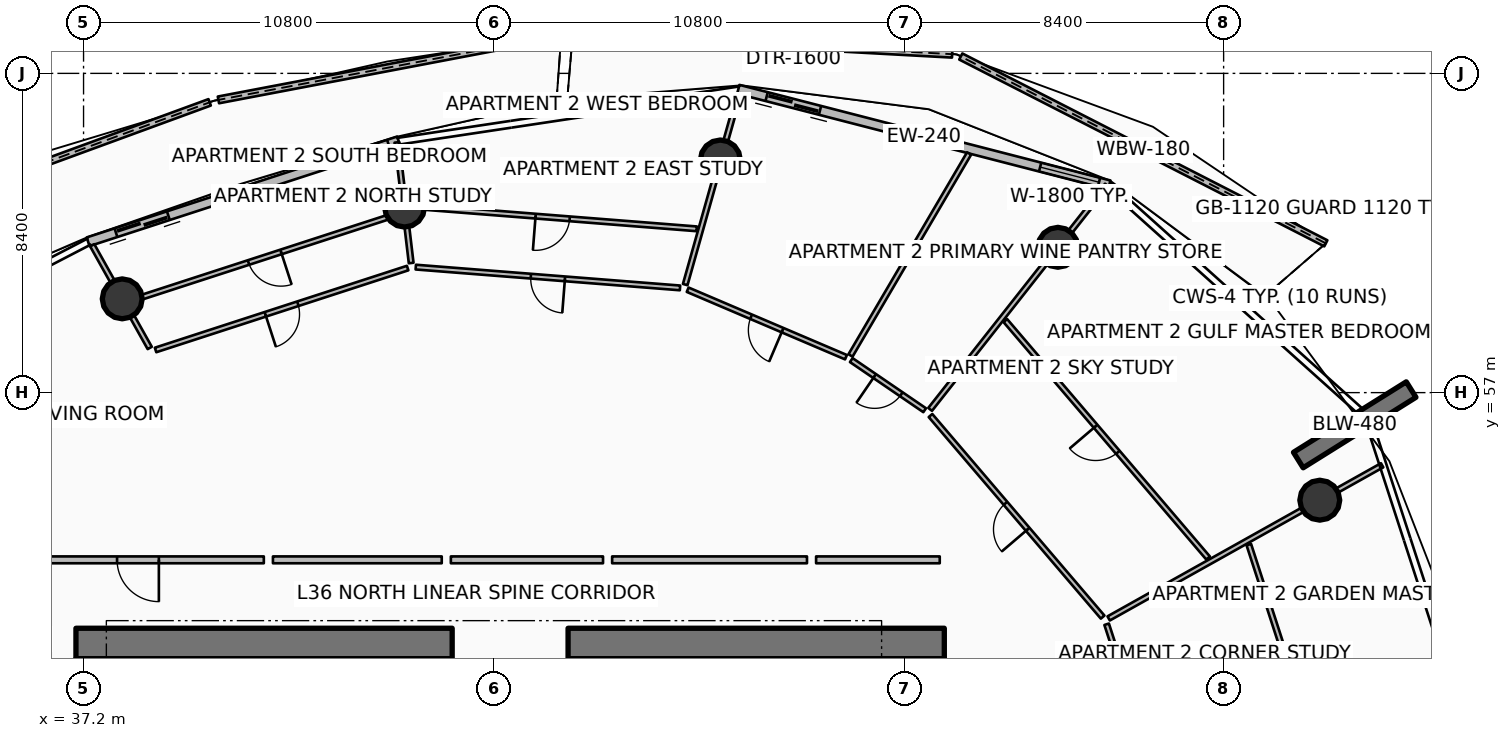
"""IFC4 building model, lengths in metres.
Left out: names, types, materials, properties, quantities, classifications, styles, units other than length and angle.
Written with IfcOpenShell. Run it as: python <this file> out.ifc"""

import sys

from ifc_helpers import new_model, si_unit, direction, frame, frame_2d, origin, origin_2d, place, context, subcontext, project, spatial, polyline, rectangle, circle, outline, extrude, element, fill, save


model = new_model("IFC4")
c1 = context("Model", 3, precision=1e-05, world=origin(), true_north=direction((0.0, 1.0)))
c2 = subcontext(c1, "Body", "Model", "MODEL_VIEW")
j1 = project(units=[si_unit("LENGTHUNIT", "METRE"), si_unit("PLANEANGLEUNIT", "RADIAN")], contexts=[c1])
p1 = place(None, origin())
s1 = spatial("IfcSite", under=j1, at=p1, CompositionType="ELEMENT")
p2 = place(p1, origin())
s2 = spatial("IfcBuilding", under=s1, at=p2, CompositionType="ELEMENT")
p3 = place(p2, frame((0.0, 0.0, 146.55)))
s3 = spatial("IfcBuildingStorey", under=s2, at=p3, CompositionType="ELEMENT", Elevation=146.55)
p4 = place(p3, frame((37.0, 50.4, 0.0), z_axis=(0.0, 0.0, 1.0), x_axis=(1.0, 0.0, 0.0)))
e1 = element("IfcWall", 1, at=p4, inside=s3, PredefinedType="SHEAR", context=c2, shape_type="SweptSolid", body=[
    extrude(rectangle(XDim=9.9, YDim=0.8, at=frame_2d((4.95, 0.0))), origin(), (0.0, 0.0, 1.0), 3.75),
])
p5 = place(p3, frame((49.95, 50.4, 0.0), z_axis=(0.0, 0.0, 1.0), x_axis=(1.0, 0.0, 0.0)))
e2 = element("IfcWall", 2, at=p5, inside=s3, PredefinedType="SHEAR", context=c2, shape_type="SweptSolid", body=[
    extrude(rectangle(XDim=9.9, YDim=0.8, at=frame_2d((4.95, 0.0))), origin(), (0.0, 0.0, 1.0), 3.75),
])
p6 = place(p3, frame((69.165, 55.226, 0.0), z_axis=(0.0, 0.0, 1.0), x_axis=(0.848053161125, 0.529911158502, 0.0)))
e3 = element("IfcWall", 3, at=p6, inside=s3, PredefinedType="SOLIDWALL", context=c2, shape_type="SweptSolid", body=[
    extrude(rectangle(XDim=3.5, YDim=0.48, at=frame_2d((1.75, 0.0))), origin(), (0.0, 0.0, 1.0), 3.75),
])
for number, where, z_axis, x_axis in (
    (4, (69.73, 54.169, 0.0), (0.0, 0.0, 1.0), (1.0, 0.0, 0.0)),
    (5, (62.84, 60.824, 0.0), (0.0, 0.0, 1.0), (1.0, 0.0, 0.0)),
    (6, (53.957, 63.122, 0.0), (0.0, 0.0, 1.0), (1.0, 0.0, 0.0)),
    (7, (45.647, 61.881, 0.0), (0.0, 0.0, 1.0), (1.0, 0.0, 0.0)),
    (8, (38.218, 59.467, 0.0), (0.0, 0.0, 1.0), (1.0, 0.0, 0.0)),
):
    element("IfcColumn", number, at=place(p3, frame(where, z_axis=z_axis, x_axis=x_axis)), inside=s3, PredefinedType="COLUMN", context=c2, shape_type="SweptSolid", body=[
        extrude(circle(Radius=0.525, at=origin_2d()), origin(), (0.0, 0.0, 1.0), 3.5),
    ])
p7 = place(p3, frame((69.89, 60.928, 0.0), z_axis=(0.0, 0.0, 1.0), x_axis=(-0.890197806796, 0.455574214345, 0.0)))
e9 = element("IfcWall", 9, at=p7, inside=s3, PredefinedType="PARAPET", context=c2, shape_type="SweptSolid", body=[
    extrude(outline(polyline([(0.0, 0.0), (10.791, 0.0), (10.791, 1.148), (5.395, 1.284), (0.0, 1.483), (0.0, 0.0)])), frame((0.0, 0.09, 0.0), z_axis=(0.0, -1.0, 0.0), x_axis=(1.0, 0.0, 0.0)), (0.0, 0.0, 1.0), 0.18),
])
p8 = place(p3, frame((60.057, 65.905, 0.0), z_axis=(0.0, 0.0, 1.0), x_axis=(-0.998521425171, 0.05435957574, 0.0)))
e10 = element("IfcWall", 10, at=p8, inside=s3, PredefinedType="PARAPET", context=c2, shape_type="SweptSolid", body=[
    extrude(outline(polyline([(0.0, 0.0), (9.998, 0.0), (9.998, 1.224), (4.999, 1.127), (0.0, 1.148), (0.0, 0.0)])), frame((0.0, 0.09, 0.0), z_axis=(0.0, -1.0, 0.0), x_axis=(1.0, 0.0, 0.0)), (0.0, 0.0, 1.0), 0.18),
])
p9 = place(p3, frame((49.772, 66.417, 0.0), z_axis=(0.0, 0.0, 1.0), x_axis=(-0.982405045707, -0.186762753697, 0.0)))
e11 = element("IfcWall", 11, at=p9, inside=s3, PredefinedType="PARAPET", context=c2, shape_type="SweptSolid", body=[
    extrude(outline(polyline([(0.0, 0.0), (9.185, 0.0), (9.184, 1.632), (4.592, 1.418), (0.0, 1.233), (0.0, 0.0)])), frame((0.0, 0.09, 0.0), z_axis=(0.0, -1.0, 0.0), x_axis=(1.0, 0.0, 0.0)), (0.0, 0.0, 1.0), 0.18),
])
p10 = place(p3, frame((40.518, 64.638, 0.0), z_axis=(0.0, 0.0, 1.0), x_axis=(-0.93889246029, -0.344210615774, 0.0)))
e12 = element("IfcWall", 12, at=p10, inside=s3, PredefinedType="PARAPET", context=c2, shape_type="SweptSolid", body=[
    extrude(outline(polyline([(0.0, 0.0), (9.449, 0.0), (9.449, 1.86), (4.725, 1.798), (0.0, 1.632), (0.0, 0.0)])), frame((0.0, 0.09, 0.0), z_axis=(0.0, -1.0, 0.0), x_axis=(1.0, 0.0, 0.0)), (0.0, 0.0, 1.0), 0.18),
])
p11 = place(p3, frame((64.192, 62.466, 0.0), z_axis=(0.0, 0.0, 1.0), x_axis=(-0.968379685126, 0.249481032214, 0.0)))
e13 = element("IfcWall", 13, at=p11, inside=s3, PredefinedType="SOLIDWALL", context=c2, shape_type="SweptSolid", body=[
    extrude(rectangle(XDim=10.082, YDim=0.24, at=frame_2d((5.041, 0.0))), origin(), (0.0, 0.0, 1.0), 2.45),
])
p12 = place(p11, frame((7.862, 0.0, 0.0)))
e14 = element("IfcOpeningElement", 14, at=p12, cuts=e13, PredefinedType="OPENING", context=c2, shape_type="SweptSolid", body=[
    extrude(rectangle(XDim=1.45, YDim=2.15, at=frame_2d((0.725, 1.075))), frame((0.0, 0.13, 0.0), z_axis=(0.0, -1.0, 0.0), x_axis=(1.0, 0.0, 0.0)), (0.0, 0.0, 1.0), 0.26),
])
p13 = place(p11, frame((0.28, 0.0, 0.65)))
e15 = element("IfcOpeningElement", 15, at=p13, cuts=e13, PredefinedType="OPENING", context=c2, shape_type="SweptSolid", body=[
    extrude(rectangle(XDim=1.6, YDim=1.5, at=frame_2d((0.8, 0.75))), frame((0.0, 0.13, 0.0), z_axis=(0.0, -1.0, 0.0), x_axis=(1.0, 0.0, 0.0)), (0.0, 0.0, 1.0), 0.26),
])
p14 = place(p3, frame((45.49, 63.624, 0.0), z_axis=(0.0, 0.0, 1.0), x_axis=(-0.951046390632, -0.309048156224, 0.0)))
e16 = element("IfcWall", 16, at=p14, inside=s3, PredefinedType="SOLIDWALL", context=c2, shape_type="SweptSolid", body=[
    extrude(rectangle(XDim=8.59, YDim=0.24, at=frame_2d((4.295, 0.0))), origin(), (0.0, 0.0, 1.0), 2.45),
])
p15 = place(p14, frame((6.37, 0.0, 0.0)))
e17 = element("IfcOpeningElement", 17, at=p15, cuts=e16, PredefinedType="OPENING", context=c2, shape_type="SweptSolid", body=[
    extrude(rectangle(XDim=1.45, YDim=2.15, at=frame_2d((0.725, 1.075))), frame((0.0, 0.13, 0.0), z_axis=(0.0, -1.0, 0.0), x_axis=(1.0, 0.0, 0.0)), (0.0, 0.0, 1.0), 0.26),
])
p16 = place(p14, frame((0.28, 0.0, 0.65)))
e18 = element("IfcOpeningElement", 18, at=p16, cuts=e16, PredefinedType="OPENING", context=c2, shape_type="SweptSolid", body=[
    extrude(rectangle(XDim=1.6, YDim=1.5, at=frame_2d((0.8, 0.75))), frame((0.0, 0.13, 0.0), z_axis=(0.0, -1.0, 0.0), x_axis=(1.0, 0.0, 0.0)), (0.0, 0.0, 1.0), 0.26),
])
p17 = place(p3, frame((41.944, 52.6, 0.0), z_axis=(0.0, 0.0, 1.0), x_axis=(-1.0, 0.0, 0.0)))
e19 = element("IfcWall", 19, at=p17, inside=s3, PredefinedType="PARTITIONING", context=c2, shape_type="SweptSolid", body=[
    extrude(rectangle(XDim=6.624, YDim=0.18, at=frame_2d((3.312, 0.0))), origin(), (0.0, 0.0, 1.0), 2.94),
])
p18 = place(p17, frame((2.762, 0.0, 0.0)))
e20 = element("IfcOpeningElement", 20, at=p18, cuts=e19, PredefinedType="OPENING", context=c2, shape_type="SweptSolid", body=[
    extrude(rectangle(XDim=1.1, YDim=2.1, at=frame_2d((0.55, 1.05))), frame((0.0, 0.1, 0.0), z_axis=(0.0, -1.0, 0.0), x_axis=(1.0, 0.0, 0.0)), (0.0, 0.0, 1.0), 0.2),
])
p19 = place(p3, frame((66.277, 44.272, 0.0), z_axis=(0.0, 0.0, 1.0), x_axis=(-0.308993461661, 0.951064162215, 0.0)))
e21 = element("IfcWall", 21, at=p19, inside=s3, PredefinedType="PARTITIONING", context=c2, shape_type="SweptSolid", body=[
    extrude(rectangle(XDim=6.974, YDim=0.125, at=frame_2d((3.487, 0.0))), origin(), (0.0, 0.0, 1.0), 2.94),
])
p20 = place(p19, frame((3.037, 0.0, 0.0)))
e22 = element("IfcOpeningElement", 22, at=p20, cuts=e21, PredefinedType="OPENING", context=c2, shape_type="SweptSolid", body=[
    extrude(rectangle(XDim=0.9, YDim=2.08, at=frame_2d((0.45, 1.04))), frame((0.0, 0.073, 0.0), z_axis=(0.0, -1.0, 0.0), x_axis=(1.0, 0.0, 0.0)), (0.0, 0.0, 1.0), 0.145),
])
p21 = place(p3, frame((70.535, 44.776, 0.0), z_axis=(0.0, 0.0, 1.0), x_axis=(-0.309002443549, 0.951061244022, 0.0)))
e23 = element("IfcWall", 23, at=p21, inside=s3, PredefinedType="PARTITIONING", context=c2, shape_type="SweptSolid", body=[
    extrude(rectangle(XDim=8.647, YDim=0.125, at=frame_2d((4.324, 0.0))), origin(), (0.0, 0.0, 1.0), 2.94),
])
p22 = place(p21, frame((3.874, 0.0, 0.0)))
e24 = element("IfcOpeningElement", 24, at=p22, cuts=e23, PredefinedType="OPENING", context=c2, shape_type="SweptSolid", body=[
    extrude(rectangle(XDim=0.9, YDim=2.08, at=frame_2d((0.45, 1.04))), frame((0.0, 0.073, 0.0), z_axis=(0.0, -1.0, 0.0), x_axis=(1.0, 0.0, 0.0)), (0.0, 0.0, 1.0), 0.145),
])
p23 = place(p3, frame((59.73, 52.6, 0.0), z_axis=(0.0, 0.0, 1.0), x_axis=(-1.0, 0.0, 0.0)))
e25 = element("IfcWall", 25, at=p23, inside=s3, PredefinedType="PARTITIONING", context=c2, shape_type="SweptSolid", body=[
    extrude(rectangle(XDim=3.254, YDim=0.18, at=frame_2d((1.627, 0.0))), origin(), (0.0, 0.0, 1.0), 2.94),
])
p24 = place(p3, frame((64.175, 51.059, 0.0), z_axis=(0.0, 0.0, 1.0), x_axis=(0.872491881101, 0.488628608877, 0.0)))
e26 = element("IfcWall", 26, at=p24, inside=s3, PredefinedType="PARTITIONING", context=c2, shape_type="SweptSolid", body=[
    extrude(rectangle(XDim=8.247, YDim=0.125, at=frame_2d((4.124, 0.0))), origin(), (0.0, 0.0, 1.0), 2.94),
])
p25 = place(p3, frame((64.017, 51.093, 0.0), z_axis=(0.0, 0.0, 1.0), x_axis=(-0.649447060425, 0.76040680935, 0.0)))
e27 = element("IfcWall", 27, at=p25, inside=s3, PredefinedType="PARTITIONING", context=c2, shape_type="SweptSolid", body=[
    extrude(rectangle(XDim=6.975, YDim=0.125, at=frame_2d((3.487, 0.0))), origin(), (0.0, 0.0, 1.0), 2.94),
])
p26 = place(p25, frame((3.037, 0.0, 0.0)))
e28 = element("IfcOpeningElement", 28, at=p26, cuts=e27, PredefinedType="OPENING", context=c2, shape_type="SweptSolid", body=[
    extrude(rectangle(XDim=0.9, YDim=2.08, at=frame_2d((0.45, 1.04))), frame((0.0, 0.073, 0.0), z_axis=(0.0, -1.0, 0.0), x_axis=(1.0, 0.0, 0.0)), (0.0, 0.0, 1.0), 0.145),
])
p27 = place(p3, frame((66.792, 52.648, 0.0), z_axis=(0.0, 0.0, 1.0), x_axis=(-0.649446834215, 0.76040700255, 0.0)))
e29 = element("IfcWall", 29, at=p27, inside=s3, PredefinedType="PARTITIONING", context=c2, shape_type="SweptSolid", body=[
    extrude(rectangle(XDim=8.216, YDim=0.125, at=frame_2d((4.108, 0.0))), origin(), (0.0, 0.0, 1.0), 2.94),
])
p28 = place(p27, frame((3.658, 0.0, 0.0)))
e30 = element("IfcOpeningElement", 30, at=p28, cuts=e29, PredefinedType="OPENING", context=c2, shape_type="SweptSolid", body=[
    extrude(rectangle(XDim=0.9, YDim=2.08, at=frame_2d((0.45, 1.04))), frame((0.0, 0.073, 0.0), z_axis=(0.0, -1.0, 0.0), x_axis=(1.0, 0.0, 0.0)), (0.0, 0.0, 1.0), 0.145),
])
p29 = place(p3, frame((56.236, 52.6, 0.0), z_axis=(0.0, 0.0, 1.0), x_axis=(-1.0, 0.0, 0.0)))
e31 = element("IfcWall", 31, at=p29, inside=s3, PredefinedType="PARTITIONING", context=c2, shape_type="SweptSolid", body=[
    extrude(rectangle(XDim=5.127, YDim=0.18, at=frame_2d((2.563, 0.0))), origin(), (0.0, 0.0, 1.0), 2.94),
])
p30 = place(p3, frame((59.477, 56.559, 0.0), z_axis=(0.0, 0.0, 1.0), x_axis=(0.619110986016, 0.785303499925, 0.0)))
e32 = element("IfcWall", 32, at=p30, inside=s3, PredefinedType="PARTITIONING", context=c2, shape_type="SweptSolid", body=[
    extrude(rectangle(XDim=7.513, YDim=0.125, at=frame_2d((3.756, 0.0))), origin(), (0.0, 0.0, 1.0), 2.94),
])
p31 = place(p3, frame((57.382, 57.978, 0.0), z_axis=(0.0, 0.0, 1.0), x_axis=(0.506339561396, 0.862334186128, 0.0)))
e33 = element("IfcWall", 33, at=p31, inside=s3, PredefinedType="PARTITIONING", context=c2, shape_type="SweptSolid", body=[
    extrude(rectangle(XDim=6.163, YDim=0.125, at=frame_2d((3.081, 0.0))), origin(), (0.0, 0.0, 1.0), 2.94),
])
p32 = place(p3, frame((59.333, 56.537, 0.0), z_axis=(0.0, 0.0, 1.0), x_axis=(-0.825780816813, 0.563991172434, 0.0)))
e34 = element("IfcWall", 34, at=p32, inside=s3, PredefinedType="PARTITIONING", context=c2, shape_type="SweptSolid", body=[
    extrude(rectangle(XDim=2.338, YDim=0.125, at=frame_2d((1.169, 0.0))), origin(), (0.0, 0.0, 1.0), 2.94),
])
p33 = place(p32, frame((0.744, 0.0, 0.0)))
e35 = element("IfcOpeningElement", 35, at=p33, cuts=e34, PredefinedType="OPENING", context=c2, shape_type="SweptSolid", body=[
    extrude(rectangle(XDim=0.85, YDim=2.06, at=frame_2d((0.425, 1.03))), frame((0.0, 0.073, 0.0), z_axis=(0.0, -1.0, 0.0), x_axis=(1.0, 0.0, 0.0)), (0.0, 0.0, 1.0), 0.145),
])
p34 = place(p3, frame((57.263, 57.932, 0.0), z_axis=(0.0, 0.0, 1.0), x_axis=(-0.919910192906, 0.392129107549, 0.0)))
e36 = element("IfcWall", 36, at=p34, inside=s3, PredefinedType="PARTITIONING", context=c2, shape_type="SweptSolid", body=[
    extrude(rectangle(XDim=4.528, YDim=0.125, at=frame_2d((2.264, 0.0))), origin(), (0.0, 0.0, 1.0), 2.94),
])
p35 = place(p34, frame((1.814, 0.0, 0.0)))
e37 = element("IfcOpeningElement", 37, at=p35, cuts=e36, PredefinedType="OPENING", context=c2, shape_type="SweptSolid", body=[
    extrude(rectangle(XDim=0.9, YDim=2.08, at=frame_2d((0.45, 1.04))), frame((0.0, 0.073, 0.0), z_axis=(0.0, -1.0, 0.0), x_axis=(1.0, 0.0, 0.0)), (0.0, 0.0, 1.0), 0.145),
])
p36 = place(p3, frame((50.869, 52.6, 0.0), z_axis=(0.0, 0.0, 1.0), x_axis=(-1.0, 0.0, 0.0)))
e38 = element("IfcWall", 38, at=p36, inside=s3, PredefinedType="PARTITIONING", context=c2, shape_type="SweptSolid", body=[
    extrude(rectangle(XDim=4.004, YDim=0.18, at=frame_2d((2.002, 0.0))), origin(), (0.0, 0.0, 1.0), 2.94),
])
p37 = place(p3, frame((53.032, 59.843, 0.0), z_axis=(0.0, 0.0, 1.0), x_axis=(0.271445669276, 0.962453764412, 0.0)))
e39 = element("IfcWall", 39, at=p37, inside=s3, PredefinedType="PARTITIONING", context=c2, shape_type="SweptSolid", body=[
    extrude(rectangle(XDim=5.2, YDim=0.125, at=frame_2d((2.6, 0.0))), origin(), (0.0, 0.0, 1.0), 2.94),
])
p38 = place(p3, frame((52.896, 59.755, 0.0), z_axis=(0.0, 0.0, 1.0), x_axis=(-0.996918496177, 0.078444324085, 0.0)))
e40 = element("IfcWall", 40, at=p38, inside=s3, PredefinedType="PARTITIONING", context=c2, shape_type="SweptSolid", body=[
    extrude(rectangle(XDim=6.975, YDim=0.125, at=frame_2d((3.487, 0.0))), origin(), (0.0, 0.0, 1.0), 2.94),
])
p39 = place(p38, frame((3.037, 0.0, 0.0)))
e41 = element("IfcOpeningElement", 41, at=p39, cuts=e40, PredefinedType="OPENING", context=c2, shape_type="SweptSolid", body=[
    extrude(rectangle(XDim=0.9, YDim=2.08, at=frame_2d((0.45, 1.04))), frame((0.0, 0.073, 0.0), z_axis=(0.0, -1.0, 0.0), x_axis=(1.0, 0.0, 0.0)), (0.0, 0.0, 1.0), 0.145),
])
p40 = place(p3, frame((53.334, 61.31, 0.0), z_axis=(0.0, 0.0, 1.0), x_axis=(-0.996916945499, 0.078464028559, 0.0)))
e42 = element("IfcWall", 42, at=p40, inside=s3, PredefinedType="PARTITIONING", context=c2, shape_type="SweptSolid", body=[
    extrude(rectangle(XDim=7.604, YDim=0.125, at=frame_2d((3.802, 0.0))), origin(), (0.0, 0.0, 1.0), 2.94),
])
p41 = place(p40, frame((3.352, 0.0, 0.0)))
e43 = element("IfcOpeningElement", 43, at=p41, cuts=e42, PredefinedType="OPENING", context=c2, shape_type="SweptSolid", body=[
    extrude(rectangle(XDim=0.9, YDim=2.08, at=frame_2d((0.45, 1.04))), frame((0.0, 0.073, 0.0), z_axis=(0.0, -1.0, 0.0), x_axis=(1.0, 0.0, 0.0)), (0.0, 0.0, 1.0), 0.145),
])
p42 = place(p3, frame((46.625, 52.6, 0.0), z_axis=(0.0, 0.0, 1.0), x_axis=(-1.0, 0.0, 0.0)))
e44 = element("IfcWall", 44, at=p42, inside=s3, PredefinedType="PARTITIONING", context=c2, shape_type="SweptSolid", body=[
    extrude(rectangle(XDim=4.442, YDim=0.18, at=frame_2d((2.221, 0.0))), origin(), (0.0, 0.0, 1.0), 2.94),
])
p43 = place(p3, frame((45.821, 60.41, 0.0), z_axis=(0.0, 0.0, 1.0), x_axis=(-0.117497237937, 0.993073209324, 0.0)))
e45 = element("IfcWall", 45, at=p43, inside=s3, PredefinedType="PARTITIONING", context=c2, shape_type="SweptSolid", body=[
    extrude(rectangle(XDim=3.196, YDim=0.125, at=frame_2d((1.598, 0.0))), origin(), (0.0, 0.0, 1.0), 2.94),
])
p44 = place(p3, frame((38.941, 58.175, 0.0), z_axis=(0.0, 0.0, 1.0), x_axis=(-0.488620181058, 0.872496600946, 0.0)))
e46 = element("IfcWall", 46, at=p44, inside=s3, PredefinedType="PARTITIONING", context=c2, shape_type="SweptSolid", body=[
    extrude(rectangle(XDim=3.095, YDim=0.125, at=frame_2d((1.548, 0.0))), origin(), (0.0, 0.0, 1.0), 2.94),
])
p45 = place(p3, frame((45.728, 60.277, 0.0), z_axis=(0.0, 0.0, 1.0), x_axis=(-0.951064162215, -0.308993461661, 0.0)))
e47 = element("IfcWall", 47, at=p45, inside=s3, PredefinedType="PARTITIONING", context=c2, shape_type="SweptSolid", body=[
    extrude(rectangle(XDim=6.974, YDim=0.125, at=frame_2d((3.487, 0.0))), origin(), (0.0, 0.0, 1.0), 2.94),
])
p46 = place(p45, frame((3.037, 0.0, 0.0)))
e48 = element("IfcOpeningElement", 48, at=p46, cuts=e47, PredefinedType="OPENING", context=c2, shape_type="SweptSolid", body=[
    extrude(rectangle(XDim=0.9, YDim=2.08, at=frame_2d((0.45, 1.04))), frame((0.0, 0.073, 0.0), z_axis=(0.0, -1.0, 0.0), x_axis=(1.0, 0.0, 0.0)), (0.0, 0.0, 1.0), 0.145),
])
p47 = place(p3, frame((45.556, 61.728, 0.0), z_axis=(0.0, 0.0, 1.0), x_axis=(-0.951060224054, -0.309005582834, 0.0)))
e49 = element("IfcWall", 49, at=p47, inside=s3, PredefinedType="PARTITIONING", context=c2, shape_type="SweptSolid", body=[
    extrude(rectangle(XDim=7.544, YDim=0.125, at=frame_2d((3.772, 0.0))), origin(), (0.0, 0.0, 1.0), 2.94),
])
p48 = place(p47, frame((3.322, 0.0, 0.0)))
e50 = element("IfcOpeningElement", 50, at=p48, cuts=e49, PredefinedType="OPENING", context=c2, shape_type="SweptSolid", body=[
    extrude(rectangle(XDim=0.9, YDim=2.08, at=frame_2d((0.45, 1.04))), frame((0.0, 0.073, 0.0), z_axis=(0.0, -1.0, 0.0), x_axis=(1.0, 0.0, 0.0)), (0.0, 0.0, 1.0), 0.145),
])
p49 = place(p12, origin())
e51 = element("IfcDoor", 51, at=p49, inside=s3, OperationType="DOUBLE_DOOR_SLIDING", PredefinedType="DOOR", context=c2, shape_type="SweptSolid", body=[
    extrude(rectangle(XDim=1.45, YDim=2.15, at=frame_2d((0.725, 1.075))), frame((0.0, 0.025, 0.0), z_axis=(0.0, -1.0, 0.0), x_axis=(1.0, 0.0, 0.0)), (0.0, 0.0, 1.0), 0.05),
])
fill(e14, e51)
p50 = place(p13, origin())
e52 = element("IfcWindow", 52, at=p50, inside=s3, PartitioningType="SINGLE_PANEL", PredefinedType="WINDOW", context=c2, shape_type="SweptSolid", body=[
    extrude(rectangle(XDim=1.6, YDim=1.5, at=frame_2d((0.8, 0.75))), frame((0.0, 0.03, 0.0), z_axis=(0.0, -1.0, 0.0), x_axis=(1.0, 0.0, 0.0)), (0.0, 0.0, 1.0), 0.06),
])
fill(e15, e52)
p51 = place(p15, origin())
e53 = element("IfcDoor", 53, at=p51, inside=s3, OperationType="DOUBLE_DOOR_SLIDING", PredefinedType="DOOR", context=c2, shape_type="SweptSolid", body=[
    extrude(rectangle(XDim=1.45, YDim=2.15, at=frame_2d((0.725, 1.075))), frame((0.0, 0.025, 0.0), z_axis=(0.0, -1.0, 0.0), x_axis=(1.0, 0.0, 0.0)), (0.0, 0.0, 1.0), 0.05),
])
fill(e17, e53)
p52 = place(p16, origin())
e54 = element("IfcWindow", 54, at=p52, inside=s3, PartitioningType="SINGLE_PANEL", PredefinedType="WINDOW", context=c2, shape_type="SweptSolid", body=[
    extrude(rectangle(XDim=1.6, YDim=1.5, at=frame_2d((0.8, 0.75))), frame((0.0, 0.03, 0.0), z_axis=(0.0, -1.0, 0.0), x_axis=(1.0, 0.0, 0.0)), (0.0, 0.0, 1.0), 0.06),
])
fill(e18, e54)
p53 = place(p18, origin())
e55 = element("IfcDoor", 55, at=p53, inside=s3, OperationType="SINGLE_SWING_LEFT", PredefinedType="DOOR", context=c2, shape_type="SweptSolid", body=[
    extrude(rectangle(XDim=1.1, YDim=2.1, at=frame_2d((0.55, 1.05))), frame((0.0, 0.025, 0.0), z_axis=(0.0, -1.0, 0.0), x_axis=(1.0, 0.0, 0.0)), (0.0, 0.0, 1.0), 0.05),
])
fill(e20, e55)
p54 = place(p26, origin())
e56 = element("IfcDoor", 56, at=p54, inside=s3, OperationType="SINGLE_SWING_LEFT", PredefinedType="DOOR", context=c2, shape_type="SweptSolid", body=[
    extrude(rectangle(XDim=0.9, YDim=2.08, at=frame_2d((0.45, 1.04))), frame((0.0, 0.025, 0.0), z_axis=(0.0, -1.0, 0.0), x_axis=(1.0, 0.0, 0.0)), (0.0, 0.0, 1.0), 0.05),
])
fill(e28, e56)
p55 = place(p28, origin())
e57 = element("IfcDoor", 57, at=p55, inside=s3, OperationType="SINGLE_SWING_RIGHT", PredefinedType="DOOR", context=c2, shape_type="SweptSolid", body=[
    extrude(rectangle(XDim=0.9, YDim=2.08, at=frame_2d((0.45, 1.04))), frame((0.0, 0.025, 0.0), z_axis=(0.0, -1.0, 0.0), x_axis=(1.0, 0.0, 0.0)), (0.0, 0.0, 1.0), 0.05),
])
fill(e30, e57)
p56 = place(p33, origin())
e58 = element("IfcDoor", 58, at=p56, inside=s3, OperationType="SINGLE_SWING_RIGHT", PredefinedType="DOOR", context=c2, shape_type="SweptSolid", body=[
    extrude(rectangle(XDim=0.85, YDim=2.06, at=frame_2d((0.425, 1.03))), frame((0.0, 0.025, 0.0), z_axis=(0.0, -1.0, 0.0), x_axis=(1.0, 0.0, 0.0)), (0.0, 0.0, 1.0), 0.05),
])
fill(e35, e58)
p57 = place(p35, origin())
e59 = element("IfcDoor", 59, at=p57, inside=s3, OperationType="SINGLE_SWING_LEFT", PredefinedType="DOOR", context=c2, shape_type="SweptSolid", body=[
    extrude(rectangle(XDim=0.9, YDim=2.08, at=frame_2d((0.45, 1.04))), frame((0.0, 0.025, 0.0), z_axis=(0.0, -1.0, 0.0), x_axis=(1.0, 0.0, 0.0)), (0.0, 0.0, 1.0), 0.05),
])
fill(e37, e59)
p58 = place(p39, origin())
e60 = element("IfcDoor", 60, at=p58, inside=s3, OperationType="SINGLE_SWING_LEFT", PredefinedType="DOOR", context=c2, shape_type="SweptSolid", body=[
    extrude(rectangle(XDim=0.9, YDim=2.08, at=frame_2d((0.45, 1.04))), frame((0.0, 0.025, 0.0), z_axis=(0.0, -1.0, 0.0), x_axis=(1.0, 0.0, 0.0)), (0.0, 0.0, 1.0), 0.05),
])
fill(e41, e60)
p59 = place(p41, origin())
e61 = element("IfcDoor", 61, at=p59, inside=s3, OperationType="SINGLE_SWING_RIGHT", PredefinedType="DOOR", context=c2, shape_type="SweptSolid", body=[
    extrude(rectangle(XDim=0.9, YDim=2.08, at=frame_2d((0.45, 1.04))), frame((0.0, 0.025, 0.0), z_axis=(0.0, -1.0, 0.0), x_axis=(1.0, 0.0, 0.0)), (0.0, 0.0, 1.0), 0.05),
])
fill(e43, e61)
p60 = place(p46, origin())
e62 = element("IfcDoor", 62, at=p60, inside=s3, OperationType="SINGLE_SWING_RIGHT", PredefinedType="DOOR", context=c2, shape_type="SweptSolid", body=[
    extrude(rectangle(XDim=0.9, YDim=2.08, at=frame_2d((0.45, 1.04))), frame((0.0, 0.025, 0.0), z_axis=(0.0, -1.0, 0.0), x_axis=(1.0, 0.0, 0.0)), (0.0, 0.0, 1.0), 0.05),
])
fill(e48, e62)
p61 = place(p48, origin())
e63 = element("IfcDoor", 63, at=p61, inside=s3, OperationType="SINGLE_SWING_LEFT", PredefinedType="DOOR", context=c2, shape_type="SweptSolid", body=[
    extrude(rectangle(XDim=0.9, YDim=2.08, at=frame_2d((0.45, 1.04))), frame((0.0, 0.025, 0.0), z_axis=(0.0, -1.0, 0.0), x_axis=(1.0, 0.0, 0.0)), (0.0, 0.0, 1.0), 0.05),
])
fill(e50, e63)
save(model, sys.argv[1])
